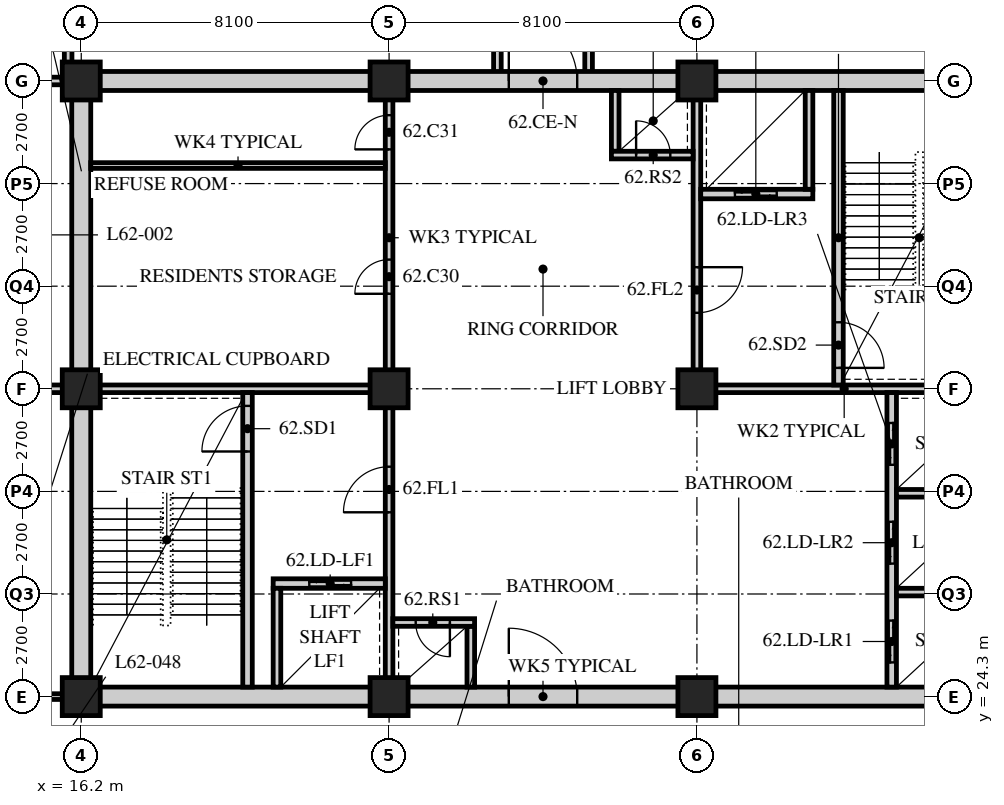
"""IFC4 building model, lengths in metres.
Left out: names, types, materials, properties, quantities, classifications, styles, units other than length and angle.
Written with IfcOpenShell. Run it as: python <this file> out.ifc"""

import sys

from ifc_helpers import new_model, si_unit, direction, frame, frame_2d, origin, origin_2d, place, context, subcontext, project, spatial, rectangle, hollow_rectangle, extrude, element, fill, save


model = new_model("IFC4")
c1 = context("Model", 3, precision=1e-05, world=origin(), true_north=direction((0.0, 1.0)))
c2 = subcontext(c1, "Body", "Model", "MODEL_VIEW")
j1 = project(units=[si_unit("LENGTHUNIT", "METRE"), si_unit("PLANEANGLEUNIT", "RADIAN")], contexts=[c1])
p1 = place(None, origin())
s1 = spatial("IfcSite", under=j1, at=p1, CompositionType="ELEMENT")
p2 = place(p1, origin())
s2 = spatial("IfcBuilding", under=s1, at=p2, CompositionType="ELEMENT")
p3 = place(p2, frame((0.0, 0.0, 242.4)))
s3 = spatial("IfcBuildingStorey", under=s2, at=p3, CompositionType="ELEMENT", Elevation=242.4)
for number, where, z_axis, x_axis in (
    (1, (16.2, 24.3, 0.0), (0.0, 0.0, 1.0), (1.0, 0.0, 0.0)),
    (2, (16.2, 32.4, 0.0), (0.0, 0.0, 1.0), (1.0, 0.0, 0.0)),
    (3, (16.2, 40.5, 0.0), (0.0, 0.0, 1.0), (1.0, 0.0, 0.0)),
    (4, (24.3, 24.3, 0.0), (0.0, 0.0, 1.0), (1.0, 0.0, 0.0)),
    (5, (24.3, 32.4, 0.0), (0.0, 0.0, 1.0), (1.0, 0.0, 0.0)),
    (6, (24.3, 40.5, 0.0), (0.0, 0.0, 1.0), (1.0, 0.0, 0.0)),
    (7, (32.4, 24.3, 0.0), (0.0, 0.0, 1.0), (1.0, 0.0, 0.0)),
    (8, (32.4, 32.4, 0.0), (0.0, 0.0, 1.0), (1.0, 0.0, 0.0)),
    (9, (32.4, 40.5, 0.0), (0.0, 0.0, 1.0), (1.0, 0.0, 0.0)),
):
    element("IfcColumn", number, at=place(p3, frame(where, z_axis=z_axis, x_axis=x_axis)), inside=s3, PredefinedType="COLUMN", context=c2, shape_type="SweptSolid", body=[
        extrude(hollow_rectangle(XDim=1.0, YDim=1.0, WallThickness=0.1, at=origin_2d()), origin(), (0.0, 0.0, 1.0), 3.9),
    ])
p4 = place(p3, frame((13.95, 24.3, 0.0), z_axis=(0.0, 0.0, 1.0), x_axis=(1.0, 0.0, 0.0)))
e10 = element("IfcWall", 10, at=p4, inside=s3, PredefinedType="PARTITIONING", context=c2, shape_type="SweptSolid", body=[
    extrude(rectangle(XDim=2.05, YDim=0.15, at=frame_2d((1.025, 0.0))), origin(), (0.0, 0.0, 1.0), 2.928),
])
p5 = place(p3, frame((13.95, 32.4, 0.0), z_axis=(0.0, 0.0, 1.0), x_axis=(1.0, 0.0, 0.0)))
e11 = element("IfcWall", 11, at=p5, inside=s3, PredefinedType="SOLIDWALL", context=c2, shape_type="SweptSolid", body=[
    extrude(rectangle(XDim=2.25, YDim=0.2, at=frame_2d((1.125, 0.0))), origin(), (0.0, 0.0, 1.0), 2.928),
])
for number, where, z_axis, x_axis in (
    (12, (15.855, 46.8, 0.0), (0.0, 0.0, 1.0), (0.0, -1.0, 0.0)),
    (13, (27.15, 40.5, 0.0), (0.0, 0.0, 1.0), (0.0, 1.0, 0.0)),
    (14, (29.55, 40.5, 0.0), (0.0, 0.0, 1.0), (0.0, 1.0, 0.0)),
):
    element("IfcWall", number, at=place(p3, frame(where, z_axis=z_axis, x_axis=x_axis)), inside=s3, PredefinedType="SOLIDWALL", context=c2, shape_type="SweptSolid", body=[
        extrude(rectangle(XDim=6.3, YDim=0.2, at=frame_2d((3.15, 0.0))), origin(), (0.0, 0.0, 1.0), 3.69),
    ])
p6 = place(p3, frame((13.95, 40.5, 0.0), z_axis=(0.0, 0.0, 1.0), x_axis=(1.0, 0.0, 0.0)))
e15 = element("IfcWall", 15, at=p6, inside=s3, PredefinedType="SOLIDWALL", context=c2, shape_type="SweptSolid", body=[
    extrude(rectangle(XDim=2.25, YDim=0.2, at=frame_2d((1.125, 0.0))), origin(), (0.0, 0.0, 1.0), 2.928),
])
p7 = place(p3, frame((15.95, 24.3, 0.0), z_axis=(0.0, 0.0, 1.0), x_axis=(1.0, 0.0, 0.0)))
e16 = element("IfcWall", 16, at=p7, inside=s3, PredefinedType="SOLIDWALL", context=c2, shape_type="SweptSolid", body=[
    extrude(rectangle(XDim=24.8, YDim=0.5, at=frame_2d((12.4, 0.0))), origin(), (0.0, 0.0, 1.0), 2.928),
])
p8 = place(p7, frame((11.5, 0.0, 0.0)))
e17 = element("IfcOpeningElement", 17, at=p8, cuts=e16, PredefinedType="OPENING", context=c2, shape_type="SweptSolid", body=[
    extrude(rectangle(XDim=1.8, YDim=2.4, at=frame_2d((0.9, 1.2))), frame((0.0, 0.26, 0.0), z_axis=(0.0, -1.0, 0.0), x_axis=(1.0, 0.0, 0.0)), (0.0, 0.0, 1.0), 0.52),
])
p9 = place(p3, frame((15.95, 40.5, 0.0), z_axis=(0.0, 0.0, 1.0), x_axis=(1.0, 0.0, 0.0)))
e18 = element("IfcWall", 18, at=p9, inside=s3, PredefinedType="SOLIDWALL", context=c2, shape_type="SweptSolid", body=[
    extrude(rectangle(XDim=24.8, YDim=0.5, at=frame_2d((12.4, 0.0))), origin(), (0.0, 0.0, 1.0), 2.928),
])
p10 = place(p9, frame((11.5, 0.0, 0.0)))
e19 = element("IfcOpeningElement", 19, at=p10, cuts=e18, PredefinedType="OPENING", context=c2, shape_type="SweptSolid", body=[
    extrude(rectangle(XDim=1.8, YDim=2.4, at=frame_2d((0.9, 1.2))), frame((0.0, 0.26, 0.0), z_axis=(0.0, -1.0, 0.0), x_axis=(1.0, 0.0, 0.0)), (0.0, 0.0, 1.0), 0.52),
])
p11 = place(p3, frame((16.2, 24.55, 0.0), z_axis=(0.0, 0.0, 1.0), x_axis=(0.0, 1.0, 0.0)))
e20 = element("IfcWall", 20, at=p11, inside=s3, PredefinedType="SOLIDWALL", context=c2, shape_type="SweptSolid", body=[
    extrude(rectangle(XDim=15.7, YDim=0.5, at=frame_2d((7.85, 0.0))), origin(), (0.0, 0.0, 1.0), 2.928),
])
p12 = place(p3, frame((16.45, 32.4, 0.0), z_axis=(0.0, 0.0, 1.0), x_axis=(1.0, 0.0, 0.0)))
e21 = element("IfcWall", 21, at=p12, inside=s3, PredefinedType="SOLIDWALL", context=c2, shape_type="SweptSolid", body=[
    extrude(rectangle(XDim=7.95, YDim=0.2, at=frame_2d((3.975, 0.0))), origin(), (0.0, 0.0, 1.0), 3.078),
])
p13 = place(p3, frame((24.3, 24.55, 0.0), z_axis=(0.0, 0.0, 1.0), x_axis=(0.0, 1.0, 0.0)))
e22 = element("IfcWall", 22, at=p13, inside=s3, PredefinedType="SOLIDWALL", context=c2, shape_type="SweptSolid", body=[
    extrude(rectangle(XDim=7.75, YDim=0.2, at=frame_2d((3.875, 0.0))), origin(), (0.0, 0.0, 1.0), 3.078),
])
p14 = place(p13, frame((4.6, 0.0, 0.0)))
e23 = element("IfcOpeningElement", 23, at=p14, cuts=e22, PredefinedType="OPENING", context=c2, shape_type="SweptSolid", body=[
    extrude(rectangle(XDim=1.2, YDim=2.1, at=frame_2d((0.6, 1.05))), frame((0.0, 0.11, 0.0), z_axis=(0.0, -1.0, 0.0), x_axis=(1.0, 0.0, 0.0)), (0.0, 0.0, 1.0), 0.22),
])
p15 = place(p3, frame((20.575, 24.55, 0.0), z_axis=(0.0, 0.0, 1.0), x_axis=(0.0, 1.0, 0.0)))
e24 = element("IfcWall", 24, at=p15, inside=s3, PredefinedType="SOLIDWALL", context=c2, shape_type="SweptSolid", body=[
    extrude(rectangle(XDim=7.75, YDim=0.25, at=frame_2d((3.875, 0.0))), origin(), (0.0, 0.0, 1.0), 3.69),
])
p16 = place(p15, frame((6.2, 0.0, 0.0)))
e25 = element("IfcOpeningElement", 25, at=p16, cuts=e24, PredefinedType="OPENING", context=c2, shape_type="SweptSolid", body=[
    extrude(rectangle(XDim=1.2, YDim=2.1, at=frame_2d((0.6, 1.05))), frame((0.0, 0.135, 0.0), z_axis=(0.0, -1.0, 0.0), x_axis=(1.0, 0.0, 0.0)), (0.0, 0.0, 1.0), 0.27),
])
p17 = place(p3, frame((21.25, 27.275, 0.0), z_axis=(0.0, 0.0, 1.0), x_axis=(1.0, 0.0, 0.0)))
e26 = element("IfcWall", 26, at=p17, inside=s3, PredefinedType="SOLIDWALL", context=c2, shape_type="SweptSolid", body=[
    extrude(rectangle(XDim=2.95, YDim=0.25, at=frame_2d((1.475, 0.0))), origin(), (0.0, 0.0, 1.0), 3.69),
])
p18 = place(p17, frame((0.95, 0.0, 0.0)))
e27 = element("IfcOpeningElement", 27, at=p18, cuts=e26, PredefinedType="OPENING", context=c2, shape_type="SweptSolid", body=[
    extrude(rectangle(XDim=1.1, YDim=2.4, at=frame_2d((0.55, 1.2))), frame((0.0, 0.135, 0.0), z_axis=(0.0, -1.0, 0.0), x_axis=(1.0, 0.0, 0.0)), (0.0, 0.0, 1.0), 0.27),
])
p19 = place(p3, frame((21.35, 24.55, 0.0), z_axis=(0.0, 0.0, 1.0), x_axis=(0.0, 1.0, 0.0)))
e28 = element("IfcWall", 28, at=p19, inside=s3, PredefinedType="SOLIDWALL", context=c2, shape_type="SweptSolid", body=[
    extrude(rectangle(XDim=2.6, YDim=0.2, at=frame_2d((1.3, 0.0))), origin(), (0.0, 0.0, 1.0), 3.69),
])
p20 = place(p3, frame((26.45, 24.55, 0.0), z_axis=(0.0, 0.0, 1.0), x_axis=(0.0, 1.0, 0.0)))
e29 = element("IfcWall", 29, at=p20, inside=s3, PredefinedType="SOLIDWALL", context=c2, shape_type="SweptSolid", body=[
    extrude(rectangle(XDim=1.6, YDim=0.2, at=frame_2d((0.8, 0.0))), origin(), (0.0, 0.0, 1.0), 3.69),
])
p21 = place(p3, frame((24.4, 26.25, 0.0), z_axis=(0.0, 0.0, 1.0), x_axis=(1.0, 0.0, 0.0)))
e30 = element("IfcWall", 30, at=p21, inside=s3, PredefinedType="SOLIDWALL", context=c2, shape_type="SweptSolid", body=[
    extrude(rectangle(XDim=2.15, YDim=0.2, at=frame_2d((1.075, 0.0))), origin(), (0.0, 0.0, 1.0), 3.69),
])
p22 = place(p21, frame((0.6, 0.0, 0.0)))
e31 = element("IfcOpeningElement", 31, at=p22, cuts=e30, PredefinedType="OPENING", context=c2, shape_type="SweptSolid", body=[
    extrude(rectangle(XDim=0.9, YDim=2.1, at=frame_2d((0.45, 1.05))), frame((0.0, 0.11, 0.0), z_axis=(0.0, -1.0, 0.0), x_axis=(1.0, 0.0, 0.0)), (0.0, 0.0, 1.0), 0.22),
])
p23 = place(p3, frame((32.3, 32.4, 0.0), z_axis=(0.0, 0.0, 1.0), x_axis=(1.0, 0.0, 0.0)))
e32 = element("IfcWall", 32, at=p23, inside=s3, PredefinedType="SOLIDWALL", context=c2, shape_type="SweptSolid", body=[
    extrude(rectangle(XDim=7.95, YDim=0.2, at=frame_2d((3.975, 0.0))), origin(), (0.0, 0.0, 1.0), 3.078),
])
p24 = place(p3, frame((32.4, 32.5, 0.0), z_axis=(0.0, 0.0, 1.0), x_axis=(0.0, 1.0, 0.0)))
e33 = element("IfcWall", 33, at=p24, inside=s3, PredefinedType="SOLIDWALL", context=c2, shape_type="SweptSolid", body=[
    extrude(rectangle(XDim=7.75, YDim=0.2, at=frame_2d((3.875, 0.0))), origin(), (0.0, 0.0, 1.0), 3.078),
])
p25 = place(p24, frame((1.9, 0.0, 0.0)))
e34 = element("IfcOpeningElement", 34, at=p25, cuts=e33, PredefinedType="OPENING", context=c2, shape_type="SweptSolid", body=[
    extrude(rectangle(XDim=1.2, YDim=2.1, at=frame_2d((0.6, 1.05))), frame((0.0, 0.11, 0.0), z_axis=(0.0, -1.0, 0.0), x_axis=(1.0, 0.0, 0.0)), (0.0, 0.0, 1.0), 0.22),
])
p26 = place(p3, frame((37.525, 24.55, 0.0), z_axis=(0.0, 0.0, 1.0), x_axis=(0.0, 1.0, 0.0)))
e35 = element("IfcWall", 35, at=p26, inside=s3, PredefinedType="SOLIDWALL", context=c2, shape_type="SweptSolid", body=[
    extrude(rectangle(XDim=7.75, YDim=0.25, at=frame_2d((3.875, 0.0))), origin(), (0.0, 0.0, 1.0), 3.69),
])
p27 = place(p26, frame((0.65, 0.0, 0.0)))
e36 = element("IfcOpeningElement", 36, at=p27, cuts=e35, PredefinedType="OPENING", context=c2, shape_type="SweptSolid", body=[
    extrude(rectangle(XDim=1.1, YDim=2.4, at=frame_2d((0.55, 1.2))), frame((0.0, 0.135, 0.0), z_axis=(0.0, -1.0, 0.0), x_axis=(1.0, 0.0, 0.0)), (0.0, 0.0, 1.0), 0.27),
])
p28 = place(p26, frame((3.25, 0.0, 0.0)))
e37 = element("IfcOpeningElement", 37, at=p28, cuts=e35, PredefinedType="OPENING", context=c2, shape_type="SweptSolid", body=[
    extrude(rectangle(XDim=1.1, YDim=2.4, at=frame_2d((0.55, 1.2))), frame((0.0, 0.135, 0.0), z_axis=(0.0, -1.0, 0.0), x_axis=(1.0, 0.0, 0.0)), (0.0, 0.0, 1.0), 0.27),
])
p29 = place(p26, frame((5.85, 0.0, 0.0)))
e38 = element("IfcOpeningElement", 38, at=p29, cuts=e35, PredefinedType="OPENING", context=c2, shape_type="SweptSolid", body=[
    extrude(rectangle(XDim=1.1, YDim=2.4, at=frame_2d((0.55, 1.2))), frame((0.0, 0.135, 0.0), z_axis=(0.0, -1.0, 0.0), x_axis=(1.0, 0.0, 0.0)), (0.0, 0.0, 1.0), 0.27),
])
for number, where, z_axis, x_axis in (
    (39, (37.65, 27.05, 0.0), (0.0, 0.0, 1.0), (1.0, 0.0, 0.0)),
    (40, (37.65, 29.65, 0.0), (0.0, 0.0, 1.0), (1.0, 0.0, 0.0)),
):
    element("IfcWall", number, at=place(p3, frame(where, z_axis=z_axis, x_axis=x_axis)), inside=s3, PredefinedType="SOLIDWALL", context=c2, shape_type="SweptSolid", body=[
        extrude(rectangle(XDim=2.6, YDim=0.2, at=frame_2d((1.3, 0.0))), origin(), (0.0, 0.0, 1.0), 3.69),
    ])
p30 = place(p3, frame((36.125, 32.5, 0.0), z_axis=(0.0, 0.0, 1.0), x_axis=(0.0, 1.0, 0.0)))
e41 = element("IfcWall", 41, at=p30, inside=s3, PredefinedType="SOLIDWALL", context=c2, shape_type="SweptSolid", body=[
    extrude(rectangle(XDim=7.75, YDim=0.25, at=frame_2d((3.875, 0.0))), origin(), (0.0, 0.0, 1.0), 3.69),
])
p31 = place(p30, frame((0.45, 0.0, 0.0)))
e42 = element("IfcOpeningElement", 42, at=p31, cuts=e41, PredefinedType="OPENING", context=c2, shape_type="SweptSolid", body=[
    extrude(rectangle(XDim=1.2, YDim=2.1, at=frame_2d((0.6, 1.05))), frame((0.0, 0.135, 0.0), z_axis=(0.0, -1.0, 0.0), x_axis=(1.0, 0.0, 0.0)), (0.0, 0.0, 1.0), 0.27),
])
p32 = place(p3, frame((32.5, 37.525, 0.0), z_axis=(0.0, 0.0, 1.0), x_axis=(1.0, 0.0, 0.0)))
e43 = element("IfcWall", 43, at=p32, inside=s3, PredefinedType="SOLIDWALL", context=c2, shape_type="SweptSolid", body=[
    extrude(rectangle(XDim=2.95, YDim=0.25, at=frame_2d((1.475, 0.0))), origin(), (0.0, 0.0, 1.0), 3.69),
])
p33 = place(p32, frame((0.9, 0.0, 0.0)))
e44 = element("IfcOpeningElement", 44, at=p33, cuts=e43, PredefinedType="OPENING", context=c2, shape_type="SweptSolid", body=[
    extrude(rectangle(XDim=1.1, YDim=2.4, at=frame_2d((0.55, 1.2))), frame((0.0, 0.135, 0.0), z_axis=(0.0, -1.0, 0.0), x_axis=(1.0, 0.0, 0.0)), (0.0, 0.0, 1.0), 0.27),
])
p34 = place(p3, frame((35.35, 37.65, 0.0), z_axis=(0.0, 0.0, 1.0), x_axis=(0.0, 1.0, 0.0)))
e45 = element("IfcWall", 45, at=p34, inside=s3, PredefinedType="SOLIDWALL", context=c2, shape_type="SweptSolid", body=[
    extrude(rectangle(XDim=2.6, YDim=0.2, at=frame_2d((1.3, 0.0))), origin(), (0.0, 0.0, 1.0), 3.69),
])
p35 = place(p3, frame((30.25, 38.65, 0.0), z_axis=(0.0, 0.0, 1.0), x_axis=(0.0, 1.0, 0.0)))
e46 = element("IfcWall", 46, at=p35, inside=s3, PredefinedType="SOLIDWALL", context=c2, shape_type="SweptSolid", body=[
    extrude(rectangle(XDim=1.6, YDim=0.2, at=frame_2d((0.8, 0.0))), origin(), (0.0, 0.0, 1.0), 3.69),
])
p36 = place(p3, frame((30.15, 38.55, 0.0), z_axis=(0.0, 0.0, 1.0), x_axis=(1.0, 0.0, 0.0)))
e47 = element("IfcWall", 47, at=p36, inside=s3, PredefinedType="SOLIDWALL", context=c2, shape_type="SweptSolid", body=[
    extrude(rectangle(XDim=2.15, YDim=0.2, at=frame_2d((1.075, 0.0))), origin(), (0.0, 0.0, 1.0), 3.69),
])
p37 = place(p36, frame((0.65, 0.0, 0.0)))
e48 = element("IfcOpeningElement", 48, at=p37, cuts=e47, PredefinedType="OPENING", context=c2, shape_type="SweptSolid", body=[
    extrude(rectangle(XDim=0.9, YDim=2.1, at=frame_2d((0.45, 1.05))), frame((0.0, 0.11, 0.0), z_axis=(0.0, -1.0, 0.0), x_axis=(1.0, 0.0, 0.0)), (0.0, 0.0, 1.0), 0.22),
])
p38 = place(p3, frame((24.3, 32.5, 0.0), z_axis=(0.0, 0.0, 1.0), x_axis=(0.0, 1.0, 0.0)))
e49 = element("IfcWall", 49, at=p38, inside=s3, PredefinedType="PARTITIONING", context=c2, shape_type="SweptSolid", body=[
    extrude(rectangle(XDim=7.75, YDim=0.2, at=frame_2d((3.875, 0.0))), origin(), (0.0, 0.0, 1.0), 3.078),
])
p39 = place(p38, frame((2.4, 0.0, 0.0)))
e50 = element("IfcOpeningElement", 50, at=p39, cuts=e49, PredefinedType="OPENING", context=c2, shape_type="SweptSolid", body=[
    extrude(rectangle(XDim=0.9, YDim=2.1, at=frame_2d((0.45, 1.05))), frame((0.0, 0.11, 0.0), z_axis=(0.0, -1.0, 0.0), x_axis=(1.0, 0.0, 0.0)), (0.0, 0.0, 1.0), 0.22),
])
p40 = place(p38, frame((6.2, 0.0, 0.0)))
e51 = element("IfcOpeningElement", 51, at=p40, cuts=e49, PredefinedType="OPENING", context=c2, shape_type="SweptSolid", body=[
    extrude(rectangle(XDim=0.9, YDim=2.1, at=frame_2d((0.45, 1.05))), frame((0.0, 0.11, 0.0), z_axis=(0.0, -1.0, 0.0), x_axis=(1.0, 0.0, 0.0)), (0.0, 0.0, 1.0), 0.22),
])
p41 = place(p3, frame((16.45, 38.275, 0.0), z_axis=(0.0, 0.0, 1.0), x_axis=(1.0, 0.0, 0.0)))
e52 = element("IfcWall", 52, at=p41, inside=s3, PredefinedType="PARTITIONING", context=c2, shape_type="SweptSolid", body=[
    extrude(rectangle(XDim=7.75, YDim=0.15, at=frame_2d((3.875, 0.0))), origin(), (0.0, 0.0, 1.0), 3.69),
])
p42 = place(p39, origin())
e53 = element("IfcDoor", 53, at=p42, inside=s3, OperationType="SINGLE_SWING_LEFT", PredefinedType="DOOR", context=c2, shape_type="SweptSolid", body=[
    extrude(rectangle(XDim=0.9, YDim=2.1, at=frame_2d((0.45, 1.05))), frame((0.0, 0.025, 0.0), z_axis=(0.0, -1.0, 0.0), x_axis=(1.0, 0.0, 0.0)), (0.0, 0.0, 1.0), 0.05),
])
fill(e50, e53)
p43 = place(p40, origin())
e54 = element("IfcDoor", 54, at=p43, inside=s3, OperationType="SINGLE_SWING_LEFT", PredefinedType="DOOR", context=c2, shape_type="SweptSolid", body=[
    extrude(rectangle(XDim=0.9, YDim=2.1, at=frame_2d((0.45, 1.05))), frame((0.0, 0.025, 0.0), z_axis=(0.0, -1.0, 0.0), x_axis=(1.0, 0.0, 0.0)), (0.0, 0.0, 1.0), 0.05),
])
fill(e51, e54)
p44 = place(p16, origin())
e55 = element("IfcDoor", 55, at=p44, inside=s3, OperationType="SINGLE_SWING_LEFT", PredefinedType="DOOR", context=c2, shape_type="SweptSolid", body=[
    extrude(rectangle(XDim=1.2, YDim=2.1, at=frame_2d((0.6, 1.05))), frame((0.0, 0.025, 0.0), z_axis=(0.0, -1.0, 0.0), x_axis=(1.0, 0.0, 0.0)), (0.0, 0.0, 1.0), 0.05),
])
fill(e25, e55)
p45 = place(p14, origin())
e56 = element("IfcDoor", 56, at=p45, inside=s3, OperationType="SINGLE_SWING_LEFT", PredefinedType="DOOR", context=c2, shape_type="SweptSolid", body=[
    extrude(rectangle(XDim=1.2, YDim=2.1, at=frame_2d((0.6, 1.05))), frame((0.0, 0.025, 0.0), z_axis=(0.0, -1.0, 0.0), x_axis=(1.0, 0.0, 0.0)), (0.0, 0.0, 1.0), 0.05),
])
fill(e23, e56)
p46 = place(p22, origin())
e57 = element("IfcDoor", 57, at=p46, inside=s3, OperationType="SINGLE_SWING_LEFT", PredefinedType="DOOR", context=c2, shape_type="SweptSolid", body=[
    extrude(rectangle(XDim=0.9, YDim=2.1, at=frame_2d((0.45, 1.05))), frame((0.0, 0.025, 0.0), z_axis=(0.0, -1.0, 0.0), x_axis=(1.0, 0.0, 0.0)), (0.0, 0.0, 1.0), 0.05),
])
fill(e31, e57)
p47 = place(p31, origin())
e58 = element("IfcDoor", 58, at=p47, inside=s3, OperationType="SINGLE_SWING_RIGHT", PredefinedType="DOOR", context=c2, shape_type="SweptSolid", body=[
    extrude(rectangle(XDim=1.2, YDim=2.1, at=frame_2d((0.6, 1.05))), frame((0.0, 0.025, 0.0), z_axis=(0.0, -1.0, 0.0), x_axis=(1.0, 0.0, 0.0)), (0.0, 0.0, 1.0), 0.05),
])
fill(e42, e58)
p48 = place(p25, origin())
e59 = element("IfcDoor", 59, at=p48, inside=s3, OperationType="SINGLE_SWING_LEFT", PredefinedType="DOOR", context=c2, shape_type="SweptSolid", body=[
    extrude(rectangle(XDim=1.2, YDim=2.1, at=frame_2d((0.6, 1.05))), frame((0.0, 0.025, 0.0), z_axis=(0.0, -1.0, 0.0), x_axis=(1.0, 0.0, 0.0)), (0.0, 0.0, 1.0), 0.05),
])
fill(e34, e59)
p49 = place(p37, origin())
e60 = element("IfcDoor", 60, at=p49, inside=s3, OperationType="SINGLE_SWING_LEFT", PredefinedType="DOOR", context=c2, shape_type="SweptSolid", body=[
    extrude(rectangle(XDim=0.9, YDim=2.1, at=frame_2d((0.45, 1.05))), frame((0.0, 0.025, 0.0), z_axis=(0.0, -1.0, 0.0), x_axis=(1.0, 0.0, 0.0)), (0.0, 0.0, 1.0), 0.05),
])
fill(e48, e60)
p50 = place(p27, origin())
e61 = element("IfcDoor", 61, at=p50, inside=s3, OperationType="DOUBLE_DOOR_SLIDING", PredefinedType="DOOR", context=c2, shape_type="SweptSolid", body=[
    extrude(rectangle(XDim=1.1, YDim=2.4, at=frame_2d((0.55, 1.2))), frame((0.0, 0.025, 0.0), z_axis=(0.0, -1.0, 0.0), x_axis=(1.0, 0.0, 0.0)), (0.0, 0.0, 1.0), 0.05),
])
fill(e36, e61)
p51 = place(p28, origin())
e62 = element("IfcDoor", 62, at=p51, inside=s3, OperationType="DOUBLE_DOOR_SLIDING", PredefinedType="DOOR", context=c2, shape_type="SweptSolid", body=[
    extrude(rectangle(XDim=1.1, YDim=2.4, at=frame_2d((0.55, 1.2))), frame((0.0, 0.025, 0.0), z_axis=(0.0, -1.0, 0.0), x_axis=(1.0, 0.0, 0.0)), (0.0, 0.0, 1.0), 0.05),
])
fill(e37, e62)
p52 = place(p29, origin())
e63 = element("IfcDoor", 63, at=p52, inside=s3, OperationType="DOUBLE_DOOR_SLIDING", PredefinedType="DOOR", context=c2, shape_type="SweptSolid", body=[
    extrude(rectangle(XDim=1.1, YDim=2.4, at=frame_2d((0.55, 1.2))), frame((0.0, 0.025, 0.0), z_axis=(0.0, -1.0, 0.0), x_axis=(1.0, 0.0, 0.0)), (0.0, 0.0, 1.0), 0.05),
])
fill(e38, e63)
p53 = place(p18, origin())
e64 = element("IfcDoor", 64, at=p53, inside=s3, OperationType="DOUBLE_DOOR_SLIDING", PredefinedType="DOOR", context=c2, shape_type="SweptSolid", body=[
    extrude(rectangle(XDim=1.1, YDim=2.4, at=frame_2d((0.55, 1.2))), frame((0.0, 0.025, 0.0), z_axis=(0.0, -1.0, 0.0), x_axis=(1.0, 0.0, 0.0)), (0.0, 0.0, 1.0), 0.05),
])
fill(e27, e64)
p54 = place(p33, origin())
e65 = element("IfcDoor", 65, at=p54, inside=s3, OperationType="DOUBLE_DOOR_SLIDING", PredefinedType="DOOR", context=c2, shape_type="SweptSolid", body=[
    extrude(rectangle(XDim=1.1, YDim=2.4, at=frame_2d((0.55, 1.2))), frame((0.0, 0.025, 0.0), z_axis=(0.0, -1.0, 0.0), x_axis=(1.0, 0.0, 0.0)), (0.0, 0.0, 1.0), 0.05),
])
fill(e44, e65)
p55 = place(p8, origin())
e66 = element("IfcDoor", 66, at=p55, inside=s3, OperationType="DOUBLE_DOOR_SINGLE_SWING", PredefinedType="DOOR", context=c2, shape_type="SweptSolid", body=[
    extrude(rectangle(XDim=1.8, YDim=2.4, at=frame_2d((0.9, 1.2))), frame((0.0, 0.025, 0.0), z_axis=(0.0, -1.0, 0.0), x_axis=(1.0, 0.0, 0.0)), (0.0, 0.0, 1.0), 0.05),
])
fill(e17, e66)
p56 = place(p10, origin())
e67 = element("IfcDoor", 67, at=p56, inside=s3, OperationType="DOUBLE_DOOR_SINGLE_SWING", PredefinedType="DOOR", context=c2, shape_type="SweptSolid", body=[
    extrude(rectangle(XDim=1.8, YDim=2.4, at=frame_2d((0.9, 1.2))), frame((0.0, 0.025, 0.0), z_axis=(0.0, -1.0, 0.0), x_axis=(1.0, 0.0, 0.0)), (0.0, 0.0, 1.0), 0.05),
])
fill(e19, e67)
save(model, sys.argv[1])
